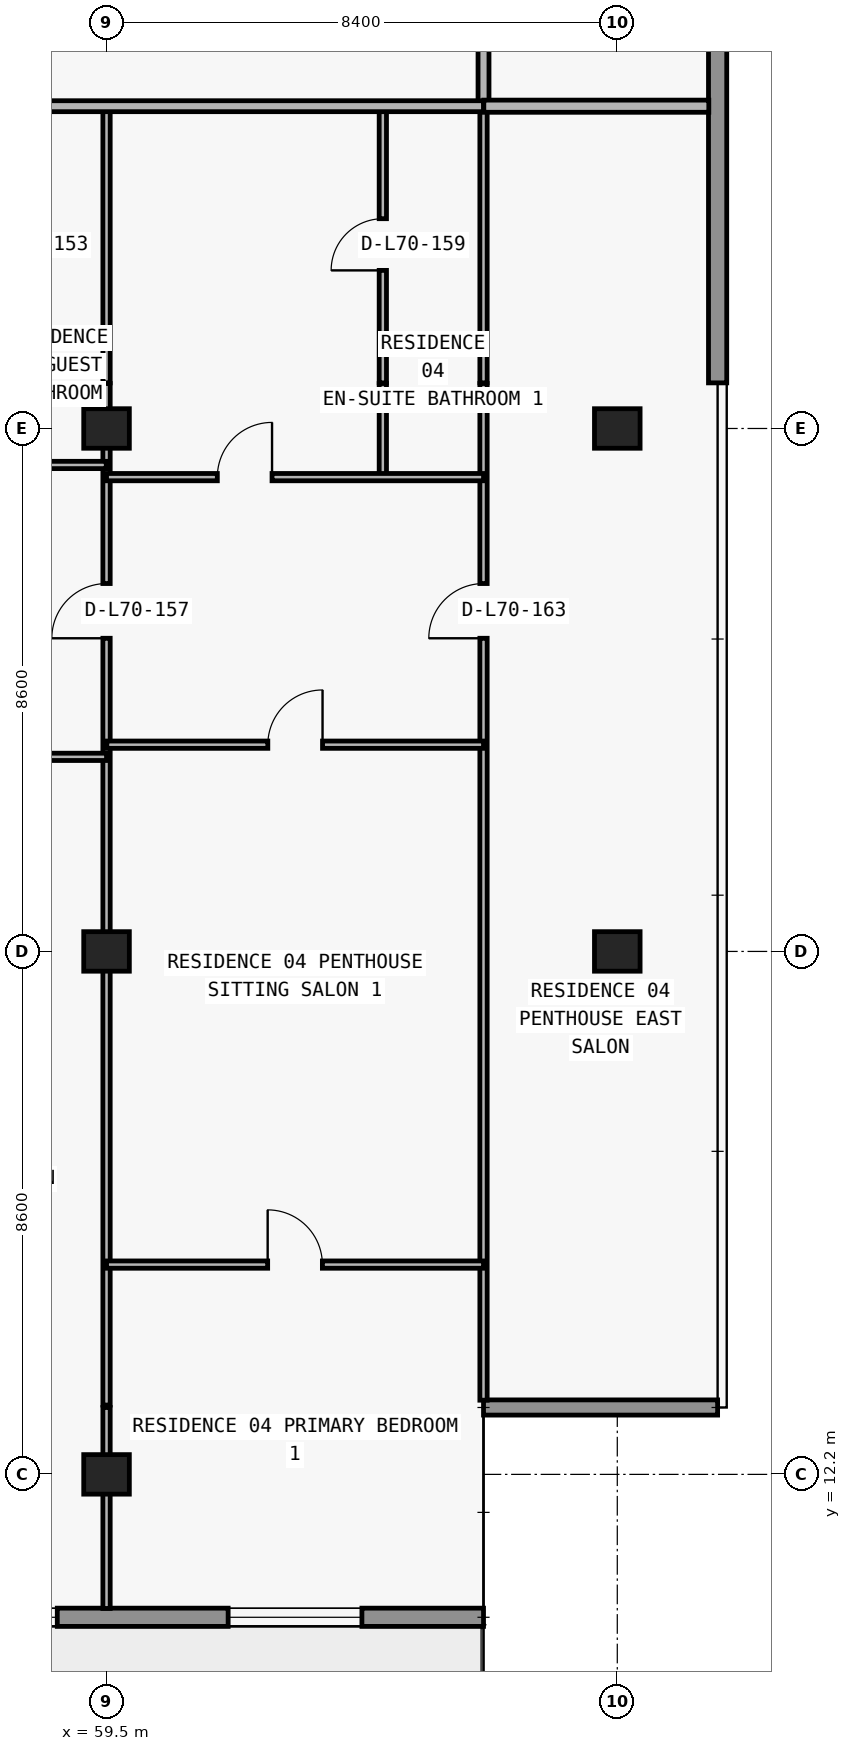
"""IFC4 building model, lengths in metres.
Left out: names, types, materials, properties, quantities, classifications, styles, units other than length and angle.
Written with IfcOpenShell. Run it as: python <this file> out.ifc"""

import sys

from ifc_helpers import new_model, si_unit, direction, frame, frame_2d, origin, origin_2d, place, context, subcontext, project, spatial, rectangle, extrude, element, fill, save


model = new_model("IFC4")
c1 = context("Model", 3, precision=1e-05, world=origin(), true_north=direction((0.0, 1.0)))
c2 = subcontext(c1, "Body", "Model", "MODEL_VIEW")
j1 = project(units=[si_unit("LENGTHUNIT", "METRE"), si_unit("PLANEANGLEUNIT", "RADIAN")], contexts=[c1])
p1 = place(None, origin())
s1 = spatial("IfcSite", under=j1, at=p1, CompositionType="ELEMENT")
p2 = place(p1, origin())
s2 = spatial("IfcBuilding", under=s1, at=p2, CompositionType="ELEMENT")
p3 = place(p2, frame((0.0, 0.0, 249.6)))
s3 = spatial("IfcBuildingStorey", under=s2, at=p3, CompositionType="ELEMENT", Elevation=249.6)
for number, where, z_axis, x_axis in (
    (1, (59.5, 12.2, 0.0), (0.0, 0.0, 1.0), (1.0, 0.0, 0.0)),
    (2, (59.5, 20.8, 0.0), (0.0, 0.0, 1.0), (1.0, 0.0, 0.0)),
    (3, (67.9, 20.8, 0.0), (0.0, 0.0, 1.0), (1.0, 0.0, 0.0)),
    (4, (59.5, 29.4, 0.0), (0.0, 0.0, 1.0), (1.0, 0.0, 0.0)),
    (5, (67.9, 29.4, 0.0), (0.0, 0.0, 1.0), (1.0, 0.0, 0.0)),
):
    element("IfcColumn", number, at=place(p3, frame(where, z_axis=z_axis, x_axis=x_axis)), inside=s3, PredefinedType="COLUMN", context=c2, shape_type="SweptSolid", body=[
        extrude(rectangle(XDim=0.75, YDim=0.65, at=origin_2d()), origin(), (0.0, 0.0, 1.0), 3.05),
    ])
p4 = place(p3, frame((65.7, 9.85, 0.0), z_axis=(0.0, 0.0, 1.0), x_axis=(-1.0, 0.0, 0.0)))
e6 = element("IfcWall", 6, at=p4, inside=s3, PredefinedType="STANDARD", context=c2, shape_type="SweptSolid", body=[
    extrude(rectangle(XDim=53.6, YDim=0.3, at=frame_2d((26.8, 0.0))), origin(), (0.0, 0.0, 1.0), 3.05),
])
p5 = place(p4, frame((48.05, 0.0, 0.85)))
e7 = element("IfcOpeningElement", 7, at=p5, cuts=e6, PredefinedType="OPENING", context=c2, shape_type="SweptSolid", body=[
    extrude(rectangle(XDim=1.8, YDim=1.55, at=frame_2d((0.9, 0.775))), frame((0.0, 0.16, 0.0), z_axis=(0.0, -1.0, 0.0), x_axis=(1.0, 0.0, 0.0)), (0.0, 0.0, 1.0), 0.32),
])
p6 = place(p4, frame((44.09, 0.0, 0.0)))
e8 = element("IfcOpeningElement", 8, at=p6, cuts=e6, PredefinedType="OPENING", context=c2, shape_type="SweptSolid", body=[
    extrude(rectangle(XDim=2.0, YDim=2.3, at=frame_2d((1.0, 1.15))), frame((0.0, 0.16, 0.0), z_axis=(0.0, -1.0, 0.0), x_axis=(1.0, 0.0, 0.0)), (0.0, 0.0, 1.0), 0.32),
])
p7 = place(p4, frame((39.99, 0.0, 0.85)))
e9 = element("IfcOpeningElement", 9, at=p7, cuts=e6, PredefinedType="OPENING", context=c2, shape_type="SweptSolid", body=[
    extrude(rectangle(XDim=1.8, YDim=1.55, at=frame_2d((0.9, 0.775))), frame((0.0, 0.16, 0.0), z_axis=(0.0, -1.0, 0.0), x_axis=(1.0, 0.0, 0.0)), (0.0, 0.0, 1.0), 0.32),
])
p8 = place(p4, frame((36.09, 0.0, 0.0)))
e10 = element("IfcOpeningElement", 10, at=p8, cuts=e6, PredefinedType="OPENING", context=c2, shape_type="SweptSolid", body=[
    extrude(rectangle(XDim=2.0, YDim=2.3, at=frame_2d((1.0, 1.15))), frame((0.0, 0.16, 0.0), z_axis=(0.0, -1.0, 0.0), x_axis=(1.0, 0.0, 0.0)), (0.0, 0.0, 1.0), 0.32),
])
p9 = place(p4, frame((31.41, 0.0, 0.65)))
e11 = element("IfcOpeningElement", 11, at=p9, cuts=e6, PredefinedType="OPENING", context=c2, shape_type="SweptSolid", body=[
    extrude(rectangle(XDim=2.6, YDim=1.85, at=frame_2d((1.3, 0.925))), frame((0.0, 0.16, 0.0), z_axis=(0.0, -1.0, 0.0), x_axis=(1.0, 0.0, 0.0)), (0.0, 0.0, 1.0), 0.32),
])
p10 = place(p4, frame((25.7, 0.0, 0.85)))
e12 = element("IfcOpeningElement", 12, at=p10, cuts=e6, PredefinedType="OPENING", context=c2, shape_type="SweptSolid", body=[
    extrude(rectangle(XDim=2.2, YDim=1.55, at=frame_2d((1.1, 0.775))), frame((0.0, 0.16, 0.0), z_axis=(0.0, -1.0, 0.0), x_axis=(1.0, 0.0, 0.0)), (0.0, 0.0, 1.0), 0.32),
])
p11 = place(p4, frame((17.7, 0.0, 0.85)))
e13 = element("IfcOpeningElement", 13, at=p11, cuts=e6, PredefinedType="OPENING", context=c2, shape_type="SweptSolid", body=[
    extrude(rectangle(XDim=2.2, YDim=1.55, at=frame_2d((1.1, 0.775))), frame((0.0, 0.16, 0.0), z_axis=(0.0, -1.0, 0.0), x_axis=(1.0, 0.0, 0.0)), (0.0, 0.0, 1.0), 0.32),
])
p12 = place(p4, frame((11.69, 0.0, 0.0)))
e14 = element("IfcOpeningElement", 14, at=p12, cuts=e6, PredefinedType="OPENING", context=c2, shape_type="SweptSolid", body=[
    extrude(rectangle(XDim=2.0, YDim=2.3, at=frame_2d((1.0, 1.15))), frame((0.0, 0.16, 0.0), z_axis=(0.0, -1.0, 0.0), x_axis=(1.0, 0.0, 0.0)), (0.0, 0.0, 1.0), 0.32),
])
p13 = place(p4, frame((7.01, 0.0, 0.65)))
e15 = element("IfcOpeningElement", 15, at=p13, cuts=e6, PredefinedType="OPENING", context=c2, shape_type="SweptSolid", body=[
    extrude(rectangle(XDim=2.6, YDim=1.85, at=frame_2d((1.3, 0.925))), frame((0.0, 0.16, 0.0), z_axis=(0.0, -1.0, 0.0), x_axis=(1.0, 0.0, 0.0)), (0.0, 0.0, 1.0), 0.32),
])
p14 = place(p4, frame((2.0, 0.0, 0.85)))
e16 = element("IfcOpeningElement", 16, at=p14, cuts=e6, PredefinedType="OPENING", context=c2, shape_type="SweptSolid", body=[
    extrude(rectangle(XDim=2.2, YDim=1.55, at=frame_2d((1.1, 0.775))), frame((0.0, 0.16, 0.0), z_axis=(0.0, -1.0, 0.0), x_axis=(1.0, 0.0, 0.0)), (0.0, 0.0, 1.0), 0.32),
])
p15 = place(p3, frame((65.7, 13.3, 0.0), z_axis=(0.0, 0.0, 1.0), x_axis=(1.0, 0.0, 0.0)))
e17 = element("IfcWall", 17, at=p15, inside=s3, PredefinedType="ELEMENTEDWALL", context=c2, shape_type="SweptSolid", body=[
    extrude(rectangle(XDim=3.85, YDim=0.25, at=frame_2d((1.925, 0.0))), origin(), (0.0, 0.0, 1.0), 3.05),
])
p16 = place(p3, frame((69.55, 47.0, 0.0), z_axis=(0.0, 0.0, 1.0), x_axis=(0.0, -1.0, 0.0)))
e18 = element("IfcWall", 18, at=p16, inside=s3, PredefinedType="STANDARD", context=c2, shape_type="SweptSolid", body=[
    extrude(rectangle(XDim=16.85, YDim=0.3, at=frame_2d((8.425, 0.0))), origin(), (0.0, 0.0, 1.0), 3.05),
])
p17 = place(p3, frame((59.5, 9.995, 0.0), z_axis=(0.0, 0.0, 1.0), x_axis=(0.0, 1.0, 0.0)))
e19 = element("IfcWall", 19, at=p17, inside=s3, PredefinedType="PARTITIONING", context=c2, shape_type="SweptSolid", body=[
    extrude(rectangle(XDim=3.305, YDim=0.12, at=frame_2d((1.652, 0.0))), origin(), (0.0, 0.0, 1.0), 2.263),
])
p18 = place(p3, frame((59.5, 13.34, 0.0), z_axis=(0.0, 0.0, 1.0), x_axis=(0.0, 1.0, 0.0)))
e20 = element("IfcWall", 20, at=p18, inside=s3, PredefinedType="PARTITIONING", context=c2, shape_type="SweptSolid", body=[
    extrude(rectangle(XDim=16.8, YDim=0.12, at=frame_2d((8.4, 0.0))), origin(), (0.0, 0.0, 1.0), 2.263),
])
p19 = place(p18, frame((12.61, 0.0, 0.0)))
e21 = element("IfcOpeningElement", 21, at=p19, cuts=e20, PredefinedType="OPENING", context=c2, shape_type="SweptSolid", body=[
    extrude(rectangle(XDim=0.9, YDim=2.15, at=frame_2d((0.45, 1.075))), frame((0.0, 0.07, 0.0), z_axis=(0.0, -1.0, 0.0), x_axis=(1.0, 0.0, 0.0)), (0.0, 0.0, 1.0), 0.14),
])
p20 = place(p3, frame((59.5, 30.15, 0.0), z_axis=(0.0, 0.0, 1.0), x_axis=(0.0, 1.0, 0.0)))
e22 = element("IfcWall", 22, at=p20, inside=s3, PredefinedType="PARTITIONING", context=c2, shape_type="SweptSolid", body=[
    extrude(rectangle(XDim=4.55, YDim=0.12, at=frame_2d((2.275, 0.0))), origin(), (0.0, 0.0, 1.0), 2.263),
])
p21 = place(p3, frame((64.044, 28.6, 0.0), z_axis=(0.0, 0.0, 1.0), x_axis=(0.0, 1.0, 0.0)))
e23 = element("IfcWall", 23, at=p21, inside=s3, PredefinedType="PARTITIONING", context=c2, shape_type="SweptSolid", body=[
    extrude(rectangle(XDim=1.54, YDim=0.12, at=frame_2d((0.77, 0.0))), origin(), (0.0, 0.0, 1.0), 3.05),
])
p22 = place(p3, frame((64.044, 30.15, 0.0), z_axis=(0.0, 0.0, 1.0), x_axis=(0.0, 1.0, 0.0)))
e24 = element("IfcWall", 24, at=p22, inside=s3, PredefinedType="PARTITIONING", context=c2, shape_type="SweptSolid", body=[
    extrude(rectangle(XDim=4.55, YDim=0.12, at=frame_2d((2.275, 0.0))), origin(), (0.0, 0.0, 1.0), 3.05),
])
p23 = place(p22, frame((1.85, 0.0, 0.0)))
e25 = element("IfcOpeningElement", 25, at=p23, cuts=e24, PredefinedType="OPENING", context=c2, shape_type="SweptSolid", body=[
    extrude(rectangle(XDim=0.85, YDim=2.1, at=frame_2d((0.425, 1.05))), frame((0.0, 0.07, 0.0), z_axis=(0.0, -1.0, 0.0), x_axis=(1.0, 0.0, 0.0)), (0.0, 0.0, 1.0), 0.14),
])
p24 = place(p3, frame((65.7, 13.42, 0.0), z_axis=(0.0, 0.0, 1.0), x_axis=(0.0, 1.0, 0.0)))
e26 = element("IfcWall", 26, at=p24, inside=s3, PredefinedType="PARTITIONING", context=c2, shape_type="SweptSolid", body=[
    extrude(rectangle(XDim=16.72, YDim=0.12, at=frame_2d((8.36, 0.0))), origin(), (0.0, 0.0, 1.0), 2.629),
])
p25 = place(p24, frame((12.53, 0.0, 0.0)))
e27 = element("IfcOpeningElement", 27, at=p25, cuts=e26, PredefinedType="OPENING", context=c2, shape_type="SweptSolid", body=[
    extrude(rectangle(XDim=0.9, YDim=2.15, at=frame_2d((0.45, 1.075))), frame((0.0, 0.07, 0.0), z_axis=(0.0, -1.0, 0.0), x_axis=(1.0, 0.0, 0.0)), (0.0, 0.0, 1.0), 0.14),
])
p26 = place(p3, frame((65.7, 30.15, 0.0), z_axis=(0.0, 0.0, 1.0), x_axis=(0.0, 1.0, 0.0)))
e28 = element("IfcWall", 28, at=p26, inside=s3, PredefinedType="PARTITIONING", context=c2, shape_type="SweptSolid", body=[
    extrude(rectangle(XDim=4.55, YDim=0.12, at=frame_2d((2.275, 0.0))), origin(), (0.0, 0.0, 1.0), 2.629),
])
p27 = place(p3, frame((65.7, 34.705, 0.0), z_axis=(0.0, 0.0, 1.0), x_axis=(0.0, 1.0, 0.0)))
e29 = element("IfcWall", 29, at=p27, inside=s3, PredefinedType="PARTITIONING", context=c2, shape_type="SweptSolid", body=[
    extrude(rectangle(XDim=2.295, YDim=0.18, at=frame_2d((1.147, 0.0))), origin(), (0.0, 0.0, 1.0), 2.629),
])
p28 = place(p3, frame((59.5, 15.65, 0.0), z_axis=(0.0, 0.0, 1.0), x_axis=(1.0, 0.0, 0.0)))
e30 = element("IfcWall", 30, at=p28, inside=s3, PredefinedType="PARTITIONING", context=c2, shape_type="SweptSolid", body=[
    extrude(rectangle(XDim=6.2, YDim=0.12, at=frame_2d((3.1, 0.0))), origin(), (0.0, 0.0, 1.0), 3.05),
])
p29 = place(p28, frame((2.65, 0.0, 0.0)))
e31 = element("IfcOpeningElement", 31, at=p29, cuts=e30, PredefinedType="OPENING", context=c2, shape_type="SweptSolid", body=[
    extrude(rectangle(XDim=0.9, YDim=2.15, at=frame_2d((0.45, 1.075))), frame((0.0, 0.07, 0.0), z_axis=(0.0, -1.0, 0.0), x_axis=(1.0, 0.0, 0.0)), (0.0, 0.0, 1.0), 0.14),
])
p30 = place(p3, frame((51.32, 24.0, 0.0), z_axis=(0.0, 0.0, 1.0), x_axis=(1.0, 0.0, 0.0)))
e32 = element("IfcWall", 32, at=p30, inside=s3, PredefinedType="PARTITIONING", context=c2, shape_type="SweptSolid", body=[
    extrude(rectangle(XDim=8.18, YDim=0.12, at=frame_2d((4.09, 0.0))), origin(), (0.0, 0.0, 1.0), 3.05),
])
p31 = place(p30, frame((1.204, 0.0, 0.0)))
e33 = element("IfcOpeningElement", 33, at=p31, cuts=e32, PredefinedType="OPENING", context=c2, shape_type="SweptSolid", body=[
    extrude(rectangle(XDim=0.9, YDim=2.15, at=frame_2d((0.45, 1.075))), frame((0.0, 0.07, 0.0), z_axis=(0.0, -1.0, 0.0), x_axis=(1.0, 0.0, 0.0)), (0.0, 0.0, 1.0), 0.14),
])
p32 = place(p3, frame((59.505, 24.2, 0.0), z_axis=(0.0, 0.0, 1.0), x_axis=(1.0, 0.0, 0.0)))
e34 = element("IfcWall", 34, at=p32, inside=s3, PredefinedType="PARTITIONING", context=c2, shape_type="SweptSolid", body=[
    extrude(rectangle(XDim=6.195, YDim=0.12, at=frame_2d((3.098, 0.0))), origin(), (0.0, 0.0, 1.0), 3.05),
])
p33 = place(p32, frame((2.647, 0.0, 0.0)))
e35 = element("IfcOpeningElement", 35, at=p33, cuts=e34, PredefinedType="OPENING", context=c2, shape_type="SweptSolid", body=[
    extrude(rectangle(XDim=0.9, YDim=2.15, at=frame_2d((0.45, 1.075))), frame((0.0, 0.07, 0.0), z_axis=(0.0, -1.0, 0.0), x_axis=(1.0, 0.0, 0.0)), (0.0, 0.0, 1.0), 0.14),
])
p34 = place(p3, frame((59.5, 28.6, 0.0), z_axis=(0.0, 0.0, 1.0), x_axis=(1.0, 0.0, 0.0)))
e36 = element("IfcWall", 36, at=p34, inside=s3, PredefinedType="PARTITIONING", context=c2, shape_type="SweptSolid", body=[
    extrude(rectangle(XDim=6.2, YDim=0.12, at=frame_2d((3.1, 0.0))), origin(), (0.0, 0.0, 1.0), 3.05),
])
p35 = place(p34, frame((1.822, 0.0, 0.0)))
e37 = element("IfcOpeningElement", 37, at=p35, cuts=e36, PredefinedType="OPENING", context=c2, shape_type="SweptSolid", body=[
    extrude(rectangle(XDim=0.9, YDim=2.15, at=frame_2d((0.45, 1.075))), frame((0.0, 0.07, 0.0), z_axis=(0.0, -1.0, 0.0), x_axis=(1.0, 0.0, 0.0)), (0.0, 0.0, 1.0), 0.14),
])
p36 = place(p3, frame((51.32, 28.8, 0.0), z_axis=(0.0, 0.0, 1.0), x_axis=(1.0, 0.0, 0.0)))
e38 = element("IfcWall", 38, at=p36, inside=s3, PredefinedType="PARTITIONING", context=c2, shape_type="SweptSolid", body=[
    extrude(rectangle(XDim=8.175, YDim=0.12, at=frame_2d((4.087, 0.0))), origin(), (0.0, 0.0, 1.0), 3.05),
])
p37 = place(p36, frame((1.204, 0.0, 0.0)))
e39 = element("IfcOpeningElement", 39, at=p37, cuts=e38, PredefinedType="OPENING", context=c2, shape_type="SweptSolid", body=[
    extrude(rectangle(XDim=0.9, YDim=2.15, at=frame_2d((0.45, 1.075))), frame((0.0, 0.07, 0.0), z_axis=(0.0, -1.0, 0.0), x_axis=(1.0, 0.0, 0.0)), (0.0, 0.0, 1.0), 0.14),
])
p38 = place(p3, frame((26.7, 34.7, 0.0), z_axis=(0.0, 0.0, 1.0), x_axis=(1.0, 0.0, 0.0)))
e40 = element("IfcWall", 40, at=p38, inside=s3, PredefinedType="PARTITIONING", context=c2, shape_type="SweptSolid", body=[
    extrude(rectangle(XDim=39.0, YDim=0.18, at=frame_2d((19.5, 0.0))), origin(), (0.0, 0.0, 1.0), 3.05),
])
p39 = place(p38, frame((2.827, 0.0, 0.0)))
e41 = element("IfcOpeningElement", 41, at=p39, cuts=e40, PredefinedType="OPENING", context=c2, shape_type="SweptSolid", body=[
    extrude(rectangle(XDim=1.0, YDim=2.2, at=frame_2d((0.5, 1.1))), frame((0.0, 0.1, 0.0), z_axis=(0.0, -1.0, 0.0), x_axis=(1.0, 0.0, 0.0)), (0.0, 0.0, 1.0), 0.2),
])
p40 = place(p38, frame((27.27, 0.0, 0.0)))
e42 = element("IfcOpeningElement", 42, at=p40, cuts=e40, PredefinedType="OPENING", context=c2, shape_type="SweptSolid", body=[
    extrude(rectangle(XDim=1.0, YDim=2.2, at=frame_2d((0.5, 1.1))), frame((0.0, 0.1, 0.0), z_axis=(0.0, -1.0, 0.0), x_axis=(1.0, 0.0, 0.0)), (0.0, 0.0, 1.0), 0.2),
])
p41 = place(p3, frame((65.705, 34.7, 0.0), z_axis=(0.0, 0.0, 1.0), x_axis=(1.0, 0.0, 0.0)))
e43 = element("IfcWall", 43, at=p41, inside=s3, PredefinedType="PARTITIONING", context=c2, shape_type="SweptSolid", body=[
    extrude(rectangle(XDim=3.7, YDim=0.2, at=frame_2d((1.85, 0.0))), origin(), (0.0, 0.0, 1.0), 3.05),
])
p42 = place(p13, origin())
e44 = element("IfcWindow", 44, at=p42, inside=s3, PartitioningType="SINGLE_PANEL", PredefinedType="WINDOW", context=c2, shape_type="SweptSolid", body=[
    extrude(rectangle(XDim=2.6, YDim=1.85, at=frame_2d((1.3, 0.925))), frame((0.0, 0.03, 0.0), z_axis=(0.0, -1.0, 0.0), x_axis=(1.0, 0.0, 0.0)), (0.0, 0.0, 1.0), 0.06),
])
fill(e15, e44)
p43 = place(p14, origin())
e45 = element("IfcWindow", 45, at=p43, inside=s3, PartitioningType="SINGLE_PANEL", PredefinedType="WINDOW", context=c2, shape_type="SweptSolid", body=[
    extrude(rectangle(XDim=2.2, YDim=1.55, at=frame_2d((1.1, 0.775))), frame((0.0, 0.03, 0.0), z_axis=(0.0, -1.0, 0.0), x_axis=(1.0, 0.0, 0.0)), (0.0, 0.0, 1.0), 0.06),
])
fill(e16, e45)
p44 = place(p19, origin())
e46 = element("IfcDoor", 46, at=p44, inside=s3, OperationType="SINGLE_SWING_LEFT", PredefinedType="DOOR", context=c2, shape_type="SweptSolid", body=[
    extrude(rectangle(XDim=0.9, YDim=2.15, at=frame_2d((0.45, 1.075))), frame((0.0, 0.025, 0.0), z_axis=(0.0, -1.0, 0.0), x_axis=(1.0, 0.0, 0.0)), (0.0, 0.0, 1.0), 0.05),
])
fill(e21, e46)
p45 = place(p35, origin())
e47 = element("IfcDoor", 47, at=p45, inside=s3, OperationType="SINGLE_SWING_RIGHT", PredefinedType="DOOR", context=c2, shape_type="SweptSolid", body=[
    extrude(rectangle(XDim=0.9, YDim=2.15, at=frame_2d((0.45, 1.075))), frame((0.0, 0.025, 0.0), z_axis=(0.0, -1.0, 0.0), x_axis=(1.0, 0.0, 0.0)), (0.0, 0.0, 1.0), 0.05),
])
fill(e37, e47)
p46 = place(p23, origin())
e48 = element("IfcDoor", 48, at=p46, inside=s3, OperationType="SINGLE_SWING_LEFT", PredefinedType="DOOR", context=c2, shape_type="SweptSolid", body=[
    extrude(rectangle(XDim=0.85, YDim=2.1, at=frame_2d((0.425, 1.05))), frame((0.0, 0.025, 0.0), z_axis=(0.0, -1.0, 0.0), x_axis=(1.0, 0.0, 0.0)), (0.0, 0.0, 1.0), 0.05),
])
fill(e25, e48)
p47 = place(p33, origin())
e49 = element("IfcDoor", 49, at=p47, inside=s3, OperationType="SINGLE_SWING_RIGHT", PredefinedType="DOOR", context=c2, shape_type="SweptSolid", body=[
    extrude(rectangle(XDim=0.9, YDim=2.15, at=frame_2d((0.45, 1.075))), frame((0.0, 0.025, 0.0), z_axis=(0.0, -1.0, 0.0), x_axis=(1.0, 0.0, 0.0)), (0.0, 0.0, 1.0), 0.05),
])
fill(e35, e49)
p48 = place(p29, origin())
e50 = element("IfcDoor", 50, at=p48, inside=s3, OperationType="SINGLE_SWING_LEFT", PredefinedType="DOOR", context=c2, shape_type="SweptSolid", body=[
    extrude(rectangle(XDim=0.9, YDim=2.15, at=frame_2d((0.45, 1.075))), frame((0.0, 0.025, 0.0), z_axis=(0.0, -1.0, 0.0), x_axis=(1.0, 0.0, 0.0)), (0.0, 0.0, 1.0), 0.05),
])
fill(e31, e50)
p49 = place(p25, origin())
e51 = element("IfcDoor", 51, at=p49, inside=s3, OperationType="SINGLE_SWING_LEFT", PredefinedType="DOOR", context=c2, shape_type="SweptSolid", body=[
    extrude(rectangle(XDim=0.9, YDim=2.15, at=frame_2d((0.45, 1.075))), frame((0.0, 0.025, 0.0), z_axis=(0.0, -1.0, 0.0), x_axis=(1.0, 0.0, 0.0)), (0.0, 0.0, 1.0), 0.05),
])
fill(e27, e51)
save(model, sys.argv[1])
